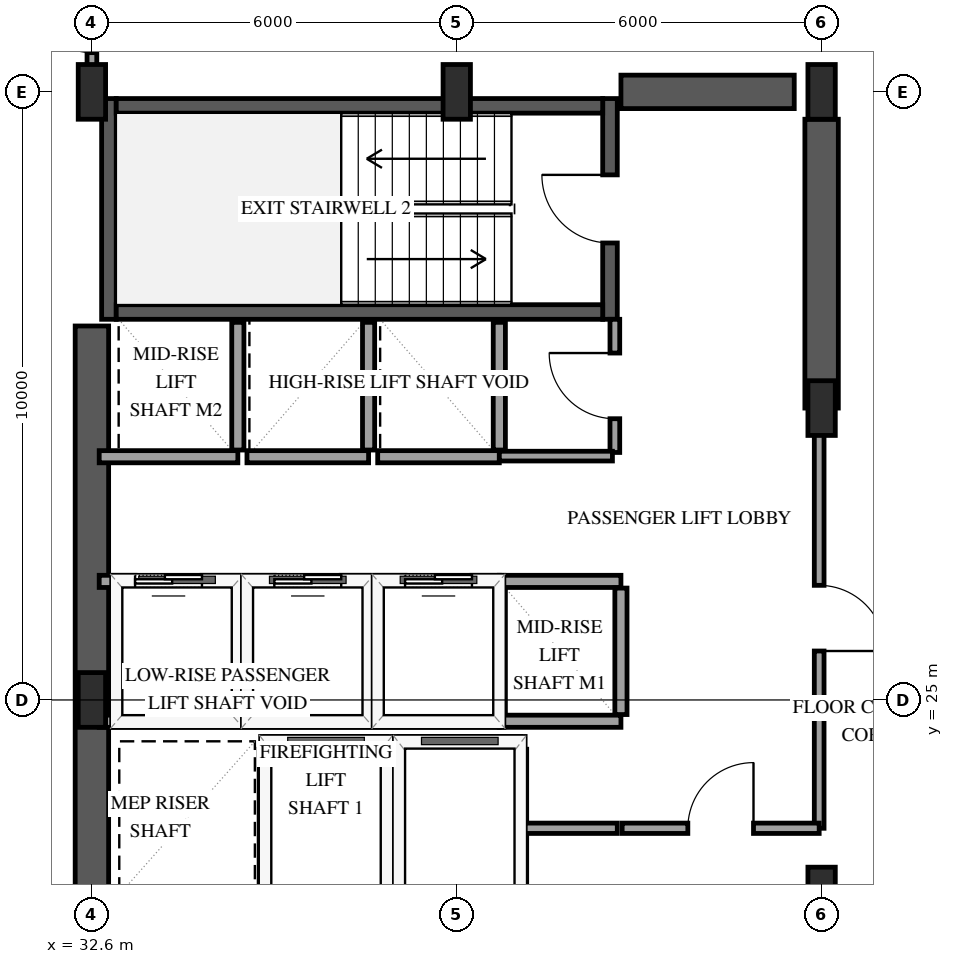
"""IFC4 building model, lengths in metres.
Left out: names, types, materials, properties, quantities, classifications, styles, units other than length and angle.
Written with IfcOpenShell. Run it as: python <this file> out.ifc"""

import sys

from ifc_helpers import new_model, si_unit, direction, frame, frame_2d, origin, origin_2d, place, context, subcontext, project, spatial, rectangle, extrude, element, fill, save


model = new_model("IFC4")
c1 = context("Model", 3, precision=1e-05, world=origin(), true_north=direction((0.0, 1.0)))
c2 = subcontext(c1, "Body", "Model", "MODEL_VIEW")
j1 = project(units=[si_unit("LENGTHUNIT", "METRE"), si_unit("PLANEANGLEUNIT", "RADIAN")], contexts=[c1])
p1 = place(None, origin())
s1 = spatial("IfcSite", under=j1, at=p1, CompositionType="ELEMENT")
p2 = place(p1, origin())
s2 = spatial("IfcBuilding", under=s1, at=p2, CompositionType="ELEMENT")
p3 = place(p2, frame((0.0, 0.0, 110.8)))
s3 = spatial("IfcBuildingStorey", under=s2, at=p3, CompositionType="ELEMENT", Elevation=110.8)
p4 = place(p3, frame((32.88, 31.26, 0.0), z_axis=(0.0, 0.0, 1.0), x_axis=(0.0, 1.0, 0.0)))
e1 = element("IfcWall", 1, at=p4, inside=s3, PredefinedType="SHEAR", context=c2, shape_type="SweptSolid", body=[
    extrude(rectangle(XDim=3.63, YDim=0.24, at=frame_2d((1.815, 0.0))), origin(), (0.0, 0.0, 1.0), 3.9),
])
p5 = place(p3, frame((41.12, 31.26, 0.0), z_axis=(0.0, 0.0, 1.0), x_axis=(0.0, 1.0, 0.0)))
e2 = element("IfcWall", 2, at=p5, inside=s3, PredefinedType="SHEAR", context=c2, shape_type="SweptSolid", body=[
    extrude(rectangle(XDim=3.63, YDim=0.24, at=frame_2d((1.815, 0.0))), origin(), (0.0, 0.0, 1.0), 3.9),
])
p6 = place(p5, frame((1.255, 0.0, 0.0)))
e3 = element("IfcOpeningElement", 3, at=p6, cuts=e2, PredefinedType="OPENING", context=c2, shape_type="SweptSolid", body=[
    extrude(rectangle(XDim=1.12, YDim=2.15, at=frame_2d((0.56, 1.075))), frame((0.0, 0.13, 0.0), z_axis=(0.0, -1.0, 0.0), x_axis=(1.0, 0.0, 0.0)), (0.0, 0.0, 1.0), 0.26),
])
for number, where, z_axis, x_axis in (
    (4, (33.0, 31.38, 0.0), (0.0, 0.0, 1.0), (1.0, 0.0, 0.0)),
    (5, (33.0, 34.77, 0.0), (0.0, 0.0, 1.0), (1.0, 0.0, 0.0)),
):
    element("IfcWall", number, at=place(p3, frame(where, z_axis=z_axis, x_axis=x_axis)), inside=s3, PredefinedType="SHEAR", context=c2, shape_type="SweptSolid", body=[
        extrude(rectangle(XDim=8.0, YDim=0.24, at=frame_2d((4.0, 0.0))), origin(), (0.0, 0.0, 1.0), 3.9),
    ])
p7 = place(p3, frame((32.6, 18.85, 0.0), z_axis=(0.0, 0.0, 1.0), x_axis=(0.0, 1.0, 0.0)))
e6 = element("IfcWall", 6, at=p7, inside=s3, PredefinedType="SHEAR", context=c2, shape_type="SweptSolid", body=[
    extrude(rectangle(XDim=12.3, YDim=0.55, at=frame_2d((6.15, 0.0))), origin(), (0.0, 0.0, 1.0), 3.9),
])
p8 = place(p3, frame((41.3, 35.0, 0.0), z_axis=(0.0, 0.0, 1.0), x_axis=(1.0, 0.0, 0.0)))
e7 = element("IfcWall", 7, at=p8, inside=s3, PredefinedType="SHEAR", context=c2, shape_type="SweptSolid", body=[
    extrude(rectangle(XDim=2.85, YDim=0.55, at=frame_2d((1.425, 0.0))), origin(), (0.0, 0.0, 1.0), 3.9),
])
p9 = place(p3, frame((44.6, 29.8, 0.0), z_axis=(0.0, 0.0, 1.0), x_axis=(0.0, 1.0, 0.0)))
e8 = element("IfcWall", 8, at=p9, inside=s3, PredefinedType="SHEAR", context=c2, shape_type="SweptSolid", body=[
    extrude(rectangle(XDim=4.75, YDim=0.55, at=frame_2d((2.375, 0.0))), origin(), (0.0, 0.0, 1.0), 3.9),
])
for number, where, z_axis, x_axis in (
    (9, (32.6, 25.0, 0.0), (0.0, 0.0, 1.0), (1.0, 0.0, 0.0)),
    (10, (32.6, 35.0, 0.0), (0.0, 0.0, 1.0), (1.0, 0.0, 0.0)),
    (11, (38.6, 35.0, 0.0), (0.0, 0.0, 1.0), (1.0, 0.0, 0.0)),
    (12, (44.6, 21.8, 0.0), (0.0, 0.0, 1.0), (1.0, 0.0, 0.0)),
    (13, (44.6, 29.8, 0.0), (0.0, 0.0, 1.0), (1.0, 0.0, 0.0)),
    (14, (44.6, 35.0, 0.0), (0.0, 0.0, 1.0), (1.0, 0.0, 0.0)),
):
    element("IfcColumn", number, at=place(p3, frame(where, z_axis=z_axis, x_axis=x_axis)), inside=s3, PredefinedType="PILASTER", context=c2, shape_type="SweptSolid", body=[
        extrude(rectangle(XDim=0.45, YDim=0.9, at=origin_2d()), origin(), (0.0, 0.0, 1.0), 3.9),
    ])
p10 = place(p3, frame((35.45, 24.3, 0.0), z_axis=(0.0, 0.0, 1.0), x_axis=(1.0, 0.0, 0.0)))
e15 = element("IfcWall", 15, at=p10, inside=s3, PredefinedType="SOLIDWALL", context=c2, shape_type="SweptSolid", body=[
    extrude(rectangle(XDim=2.0, YDim=0.2, at=frame_2d((1.0, 0.0))), origin(), (0.0, 0.0, 1.0), 3.6),
])
for number, where, z_axis, x_axis in (
    (16, (35.45, 21.81, 0.0), (0.0, 0.0, 1.0), (0.0, 1.0, 0.0)),
    (17, (37.45, 21.81, 0.0), (0.0, 0.0, 1.0), (0.0, 1.0, 0.0)),
):
    element("IfcWall", number, at=place(p3, frame(where, z_axis=z_axis, x_axis=x_axis)), inside=s3, PredefinedType="SOLIDWALL", context=c2, shape_type="SweptSolid", body=[
        extrude(rectangle(XDim=2.38, YDim=0.2, at=frame_2d((1.19, 0.0))), origin(), (0.0, 0.0, 1.0), 3.6),
    ])
p11 = place(p3, frame((37.65, 24.3, 0.0), z_axis=(0.0, 0.0, 1.0), x_axis=(1.0, 0.0, 0.0)))
e18 = element("IfcWall", 18, at=p11, inside=s3, PredefinedType="SOLIDWALL", context=c2, shape_type="SweptSolid", body=[
    extrude(rectangle(XDim=2.0, YDim=0.2, at=frame_2d((1.0, 0.0))), origin(), (0.0, 0.0, 1.0), 3.6),
])
p12 = place(p3, frame((39.65, 21.81, 0.0), z_axis=(0.0, 0.0, 1.0), x_axis=(0.0, 1.0, 0.0)))
e19 = element("IfcWall", 19, at=p12, inside=s3, PredefinedType="SOLIDWALL", context=c2, shape_type="SweptSolid", body=[
    extrude(rectangle(XDim=2.38, YDim=0.2, at=frame_2d((1.19, 0.0))), origin(), (0.0, 0.0, 1.0), 3.6),
])
p13 = place(p3, frame((32.72, 24.65, 0.0), z_axis=(0.0, 0.0, 1.0), x_axis=(1.0, 0.0, 0.0)))
e20 = element("IfcWall", 20, at=p13, inside=s3, PredefinedType="SOLIDWALL", context=c2, shape_type="SweptSolid", body=[
    extrude(rectangle(XDim=2.28, YDim=0.2, at=frame_2d((1.14, 0.0))), origin(), (0.0, 0.0, 1.0), 3.6),
])
p14 = place(p3, frame((32.72, 26.95, 0.0), z_axis=(0.0, 0.0, 1.0), x_axis=(1.0, 0.0, 0.0)))
e21 = element("IfcWall", 21, at=p14, inside=s3, PredefinedType="SOLIDWALL", context=c2, shape_type="SweptSolid", body=[
    extrude(rectangle(XDim=2.28, YDim=0.2, at=frame_2d((1.14, 0.0))), origin(), (0.0, 0.0, 1.0), 3.6),
])
p15 = place(p14, frame((0.59, 0.0, 0.0)))
e22 = element("IfcOpeningElement", 22, at=p15, cuts=e21, PredefinedType="OPENING", context=c2, shape_type="SweptSolid", body=[
    extrude(rectangle(XDim=1.1, YDim=2.15, at=frame_2d((0.55, 1.075))), frame((0.0, 0.11, 0.0), z_axis=(0.0, -1.0, 0.0), x_axis=(1.0, 0.0, 0.0)), (0.0, 0.0, 1.0), 0.22),
])
p16 = place(p3, frame((35.0, 24.76, 0.0), z_axis=(0.0, 0.0, 1.0), x_axis=(0.0, 1.0, 0.0)))
e23 = element("IfcWall", 23, at=p16, inside=s3, PredefinedType="SOLIDWALL", context=c2, shape_type="SweptSolid", body=[
    extrude(rectangle(XDim=2.08, YDim=0.2, at=frame_2d((1.04, 0.0))), origin(), (0.0, 0.0, 1.0), 3.6),
])
p17 = place(p3, frame((35.15, 24.65, 0.0), z_axis=(0.0, 0.0, 1.0), x_axis=(1.0, 0.0, 0.0)))
e24 = element("IfcWall", 24, at=p17, inside=s3, PredefinedType="SOLIDWALL", context=c2, shape_type="SweptSolid", body=[
    extrude(rectangle(XDim=2.0, YDim=0.2, at=frame_2d((1.0, 0.0))), origin(), (0.0, 0.0, 1.0), 3.6),
])
p18 = place(p3, frame((35.15, 26.95, 0.0), z_axis=(0.0, 0.0, 1.0), x_axis=(1.0, 0.0, 0.0)))
e25 = element("IfcWall", 25, at=p18, inside=s3, PredefinedType="SOLIDWALL", context=c2, shape_type="SweptSolid", body=[
    extrude(rectangle(XDim=2.0, YDim=0.2, at=frame_2d((1.0, 0.0))), origin(), (0.0, 0.0, 1.0), 3.6),
])
p19 = place(p18, frame((0.45, 0.0, 0.0)))
e26 = element("IfcOpeningElement", 26, at=p19, cuts=e25, PredefinedType="OPENING", context=c2, shape_type="SweptSolid", body=[
    extrude(rectangle(XDim=1.1, YDim=2.15, at=frame_2d((0.55, 1.075))), frame((0.0, 0.11, 0.0), z_axis=(0.0, -1.0, 0.0), x_axis=(1.0, 0.0, 0.0)), (0.0, 0.0, 1.0), 0.22),
])
p20 = place(p3, frame((37.15, 24.76, 0.0), z_axis=(0.0, 0.0, 1.0), x_axis=(0.0, 1.0, 0.0)))
e27 = element("IfcWall", 27, at=p20, inside=s3, PredefinedType="SOLIDWALL", context=c2, shape_type="SweptSolid", body=[
    extrude(rectangle(XDim=2.08, YDim=0.2, at=frame_2d((1.04, 0.0))), origin(), (0.0, 0.0, 1.0), 3.6),
])
p21 = place(p3, frame((37.3, 24.65, 0.0), z_axis=(0.0, 0.0, 1.0), x_axis=(1.0, 0.0, 0.0)))
e28 = element("IfcWall", 28, at=p21, inside=s3, PredefinedType="SOLIDWALL", context=c2, shape_type="SweptSolid", body=[
    extrude(rectangle(XDim=2.0, YDim=0.2, at=frame_2d((1.0, 0.0))), origin(), (0.0, 0.0, 1.0), 3.6),
])
p22 = place(p3, frame((37.3, 26.95, 0.0), z_axis=(0.0, 0.0, 1.0), x_axis=(1.0, 0.0, 0.0)))
e29 = element("IfcWall", 29, at=p22, inside=s3, PredefinedType="SOLIDWALL", context=c2, shape_type="SweptSolid", body=[
    extrude(rectangle(XDim=2.0, YDim=0.2, at=frame_2d((1.0, 0.0))), origin(), (0.0, 0.0, 1.0), 3.6),
])
p23 = place(p22, frame((0.45, 0.0, 0.0)))
e30 = element("IfcOpeningElement", 30, at=p23, cuts=e29, PredefinedType="OPENING", context=c2, shape_type="SweptSolid", body=[
    extrude(rectangle(XDim=1.1, YDim=2.15, at=frame_2d((0.55, 1.075))), frame((0.0, 0.11, 0.0), z_axis=(0.0, -1.0, 0.0), x_axis=(1.0, 0.0, 0.0)), (0.0, 0.0, 1.0), 0.22),
])
p24 = place(p3, frame((39.3, 24.76, 0.0), z_axis=(0.0, 0.0, 1.0), x_axis=(0.0, 1.0, 0.0)))
e31 = element("IfcWall", 31, at=p24, inside=s3, PredefinedType="SOLIDWALL", context=c2, shape_type="SweptSolid", body=[
    extrude(rectangle(XDim=2.08, YDim=0.2, at=frame_2d((1.04, 0.0))), origin(), (0.0, 0.0, 1.0), 3.6),
])
for number, where, z_axis, x_axis in (
    (32, (39.3, 24.65, 0.0), (0.0, 0.0, 1.0), (1.0, 0.0, 0.0)),
    (33, (39.3, 26.95, 0.0), (0.0, 0.0, 1.0), (1.0, 0.0, 0.0)),
):
    element("IfcWall", number, at=place(p3, frame(where, z_axis=z_axis, x_axis=x_axis)), inside=s3, PredefinedType="SOLIDWALL", context=c2, shape_type="SweptSolid", body=[
        extrude(rectangle(XDim=2.0, YDim=0.2, at=frame_2d((1.0, 0.0))), origin(), (0.0, 0.0, 1.0), 3.6),
    ])
p25 = place(p3, frame((41.3, 24.76, 0.0), z_axis=(0.0, 0.0, 1.0), x_axis=(0.0, 1.0, 0.0)))
e34 = element("IfcWall", 34, at=p25, inside=s3, PredefinedType="SOLIDWALL", context=c2, shape_type="SweptSolid", body=[
    extrude(rectangle(XDim=2.08, YDim=0.2, at=frame_2d((1.04, 0.0))), origin(), (0.0, 0.0, 1.0), 3.6),
])
p26 = place(p3, frame((32.72, 29.0, 0.0), z_axis=(0.0, 0.0, 1.0), x_axis=(1.0, 0.0, 0.0)))
e35 = element("IfcWall", 35, at=p26, inside=s3, PredefinedType="SOLIDWALL", context=c2, shape_type="SweptSolid", body=[
    extrude(rectangle(XDim=2.28, YDim=0.2, at=frame_2d((1.14, 0.0))), origin(), (0.0, 0.0, 1.0), 3.6),
])
p27 = place(p3, frame((35.0, 29.11, 0.0), z_axis=(0.0, 0.0, 1.0), x_axis=(0.0, 1.0, 0.0)))
e36 = element("IfcWall", 36, at=p27, inside=s3, PredefinedType="SOLIDWALL", context=c2, shape_type="SweptSolid", body=[
    extrude(rectangle(XDim=2.1, YDim=0.2, at=frame_2d((1.05, 0.0))), origin(), (0.0, 0.0, 1.0), 3.6),
])
p28 = place(p3, frame((35.15, 29.0, 0.0), z_axis=(0.0, 0.0, 1.0), x_axis=(1.0, 0.0, 0.0)))
e37 = element("IfcWall", 37, at=p28, inside=s3, PredefinedType="SOLIDWALL", context=c2, shape_type="SweptSolid", body=[
    extrude(rectangle(XDim=2.0, YDim=0.2, at=frame_2d((1.0, 0.0))), origin(), (0.0, 0.0, 1.0), 3.6),
])
p29 = place(p3, frame((37.15, 29.11, 0.0), z_axis=(0.0, 0.0, 1.0), x_axis=(0.0, 1.0, 0.0)))
e38 = element("IfcWall", 38, at=p29, inside=s3, PredefinedType="SOLIDWALL", context=c2, shape_type="SweptSolid", body=[
    extrude(rectangle(XDim=2.1, YDim=0.2, at=frame_2d((1.05, 0.0))), origin(), (0.0, 0.0, 1.0), 3.6),
])
p30 = place(p3, frame((37.3, 29.0, 0.0), z_axis=(0.0, 0.0, 1.0), x_axis=(1.0, 0.0, 0.0)))
e39 = element("IfcWall", 39, at=p30, inside=s3, PredefinedType="SOLIDWALL", context=c2, shape_type="SweptSolid", body=[
    extrude(rectangle(XDim=2.0, YDim=0.2, at=frame_2d((1.0, 0.0))), origin(), (0.0, 0.0, 1.0), 3.6),
])
p31 = place(p3, frame((39.3, 29.11, 0.0), z_axis=(0.0, 0.0, 1.0), x_axis=(0.0, 1.0, 0.0)))
e40 = element("IfcWall", 40, at=p31, inside=s3, PredefinedType="SOLIDWALL", context=c2, shape_type="SweptSolid", body=[
    extrude(rectangle(XDim=2.1, YDim=0.2, at=frame_2d((1.05, 0.0))), origin(), (0.0, 0.0, 1.0), 3.6),
])
p32 = place(p3, frame((44.56, 29.8, 0.0), z_axis=(0.0, 0.0, 1.0), x_axis=(0.0, -1.0, 0.0)))
e41 = element("IfcWall", 41, at=p32, inside=s3, PredefinedType="PARTITIONING", context=c2, shape_type="SweptSolid", body=[
    extrude(rectangle(XDim=6.91, YDim=0.16, at=frame_2d((3.455, 0.0))), origin(), (0.0, 0.0, 1.0), 2.64),
])
p33 = place(p32, frame((2.915, 0.0, 0.0)))
e42 = element("IfcOpeningElement", 42, at=p33, cuts=e41, PredefinedType="OPENING", context=c2, shape_type="SweptSolid", body=[
    extrude(rectangle(XDim=1.08, YDim=2.15, at=frame_2d((0.54, 1.075))), frame((0.0, 0.09, 0.0), z_axis=(0.0, -1.0, 0.0), x_axis=(1.0, 0.0, 0.0)), (0.0, 0.0, 1.0), 0.18),
])
p34 = place(p3, frame((41.32, 22.89, 0.0), z_axis=(0.0, 0.0, 1.0), x_axis=(1.0, 0.0, 0.0)))
e43 = element("IfcWall", 43, at=p34, inside=s3, PredefinedType="PARTITIONING", context=c2, shape_type="SweptSolid", body=[
    extrude(rectangle(XDim=3.24, YDim=0.17, at=frame_2d((1.62, 0.0))), origin(), (0.0, 0.0, 1.0), 3.6),
])
p35 = place(p34, frame((1.08, 0.0, 0.0)))
e44 = element("IfcOpeningElement", 44, at=p35, cuts=e43, PredefinedType="OPENING", context=c2, shape_type="SweptSolid", body=[
    extrude(rectangle(XDim=1.08, YDim=2.15, at=frame_2d((0.54, 1.075))), frame((0.0, 0.095, 0.0), z_axis=(0.0, -1.0, 0.0), x_axis=(1.0, 0.0, 0.0)), (0.0, 0.0, 1.0), 0.19),
])
p36 = place(p3, frame((41.2, 29.07, 0.0), z_axis=(0.0, 0.0, 1.0), x_axis=(0.0, 1.0, 0.0)))
e45 = element("IfcWall", 45, at=p36, inside=s3, PredefinedType="PARTITIONING", context=c2, shape_type="SweptSolid", body=[
    extrude(rectangle(XDim=2.19, YDim=0.16, at=frame_2d((1.095, 0.0))), origin(), (0.0, 0.0, 1.0), 3.6),
])
p37 = place(p36, frame((0.555, 0.0, 0.0)))
e46 = element("IfcOpeningElement", 46, at=p37, cuts=e45, PredefinedType="OPENING", context=c2, shape_type="SweptSolid", body=[
    extrude(rectangle(XDim=1.08, YDim=2.15, at=frame_2d((0.54, 1.075))), frame((0.0, 0.09, 0.0), z_axis=(0.0, -1.0, 0.0), x_axis=(1.0, 0.0, 0.0)), (0.0, 0.0, 1.0), 0.18),
])
p38 = place(p3, frame((32.6, 35.07, 0.0), z_axis=(0.0, 0.0, 1.0), x_axis=(0.0, 1.0, 0.0)))
e47 = element("IfcWall", 47, at=p38, inside=s3, PredefinedType="PARTITIONING", context=c2, shape_type="SweptSolid", body=[
    extrude(rectangle(XDim=1.91, YDim=0.16, at=frame_2d((0.955, 0.0))), origin(), (0.0, 0.0, 1.0), 3.6),
])
p39 = place(p38, frame((0.575, 0.0, 0.0)))
e48 = element("IfcOpeningElement", 48, at=p39, cuts=e47, PredefinedType="OPENING", context=c2, shape_type="SweptSolid", body=[
    extrude(rectangle(XDim=0.95, YDim=2.15, at=frame_2d((0.475, 1.075))), frame((0.0, 0.09, 0.0), z_axis=(0.0, -1.0, 0.0), x_axis=(1.0, 0.0, 0.0)), (0.0, 0.0, 1.0), 0.18),
])
p40 = place(p3, frame((39.3, 29.01, 0.0), z_axis=(0.0, 0.0, 1.0), x_axis=(1.0, 0.0, 0.0)))
e49 = element("IfcWall", 49, at=p40, inside=s3, PredefinedType="PARTITIONING", context=c2, shape_type="SweptSolid", body=[
    extrude(rectangle(XDim=1.86, YDim=0.16, at=frame_2d((0.93, 0.0))), origin(), (0.0, 0.0, 1.0), 3.6),
])
p41 = place(p3, frame((39.72, 22.89, 0.0), z_axis=(0.0, 0.0, 1.0), x_axis=(1.0, 0.0, 0.0)))
e50 = element("IfcWall", 50, at=p41, inside=s3, PredefinedType="PARTITIONING", context=c2, shape_type="SweptSolid", body=[
    extrude(rectangle(XDim=1.52, YDim=0.17, at=frame_2d((0.76, 0.0))), origin(), (0.0, 0.0, 1.0), 3.6),
])
p42 = place(p15, origin())
e51 = element("IfcDoor", 51, at=p42, inside=s3, OperationType="SLIDING_TO_LEFT", PredefinedType="DOOR", context=c2, shape_type="SweptSolid", body=[
    extrude(rectangle(XDim=1.1, YDim=2.15, at=frame_2d((0.55, 1.075))), frame((0.0, 0.025, 0.0), z_axis=(0.0, -1.0, 0.0), x_axis=(1.0, 0.0, 0.0)), (0.0, 0.0, 1.0), 0.05),
])
fill(e22, e51)
p43 = place(p19, origin())
e52 = element("IfcDoor", 52, at=p43, inside=s3, OperationType="SLIDING_TO_LEFT", PredefinedType="DOOR", context=c2, shape_type="SweptSolid", body=[
    extrude(rectangle(XDim=1.1, YDim=2.15, at=frame_2d((0.55, 1.075))), frame((0.0, 0.025, 0.0), z_axis=(0.0, -1.0, 0.0), x_axis=(1.0, 0.0, 0.0)), (0.0, 0.0, 1.0), 0.05),
])
fill(e26, e52)
p44 = place(p23, origin())
e53 = element("IfcDoor", 53, at=p44, inside=s3, OperationType="SLIDING_TO_LEFT", PredefinedType="DOOR", context=c2, shape_type="SweptSolid", body=[
    extrude(rectangle(XDim=1.1, YDim=2.15, at=frame_2d((0.55, 1.075))), frame((0.0, 0.025, 0.0), z_axis=(0.0, -1.0, 0.0), x_axis=(1.0, 0.0, 0.0)), (0.0, 0.0, 1.0), 0.05),
])
fill(e30, e53)
p45 = place(p6, origin())
e54 = element("IfcDoor", 54, at=p45, inside=s3, OperationType="SINGLE_SWING_RIGHT", PredefinedType="DOOR", context=c2, shape_type="SweptSolid", body=[
    extrude(rectangle(XDim=1.12, YDim=2.15, at=frame_2d((0.56, 1.075))), frame((0.0, 0.025, 0.0), z_axis=(0.0, -1.0, 0.0), x_axis=(1.0, 0.0, 0.0)), (0.0, 0.0, 1.0), 0.05),
])
fill(e3, e54)
p46 = place(p33, origin())
e55 = element("IfcDoor", 55, at=p46, inside=s3, OperationType="SINGLE_SWING_RIGHT", PredefinedType="DOOR", context=c2, shape_type="SweptSolid", body=[
    extrude(rectangle(XDim=1.08, YDim=2.15, at=frame_2d((0.54, 1.075))), frame((0.0, 0.025, 0.0), z_axis=(0.0, -1.0, 0.0), x_axis=(1.0, 0.0, 0.0)), (0.0, 0.0, 1.0), 0.05),
])
fill(e42, e55)
p47 = place(p35, origin())
e56 = element("IfcDoor", 56, at=p47, inside=s3, OperationType="SINGLE_SWING_RIGHT", PredefinedType="DOOR", context=c2, shape_type="SweptSolid", body=[
    extrude(rectangle(XDim=1.08, YDim=2.15, at=frame_2d((0.54, 1.075))), frame((0.0, 0.025, 0.0), z_axis=(0.0, -1.0, 0.0), x_axis=(1.0, 0.0, 0.0)), (0.0, 0.0, 1.0), 0.05),
])
fill(e44, e56)
p48 = place(p37, origin())
e57 = element("IfcDoor", 57, at=p48, inside=s3, OperationType="SINGLE_SWING_RIGHT", PredefinedType="DOOR", context=c2, shape_type="SweptSolid", body=[
    extrude(rectangle(XDim=1.08, YDim=2.15, at=frame_2d((0.54, 1.075))), frame((0.0, 0.025, 0.0), z_axis=(0.0, -1.0, 0.0), x_axis=(1.0, 0.0, 0.0)), (0.0, 0.0, 1.0), 0.05),
])
fill(e46, e57)
p49 = place(p39, origin())
e58 = element("IfcDoor", 58, at=p49, inside=s3, OperationType="SINGLE_SWING_RIGHT", PredefinedType="DOOR", context=c2, shape_type="SweptSolid", body=[
    extrude(rectangle(XDim=0.95, YDim=2.15, at=frame_2d((0.475, 1.075))), frame((0.0, 0.025, 0.0), z_axis=(0.0, -1.0, 0.0), x_axis=(1.0, 0.0, 0.0)), (0.0, 0.0, 1.0), 0.05),
])
fill(e48, e58)
save(model, sys.argv[1])
